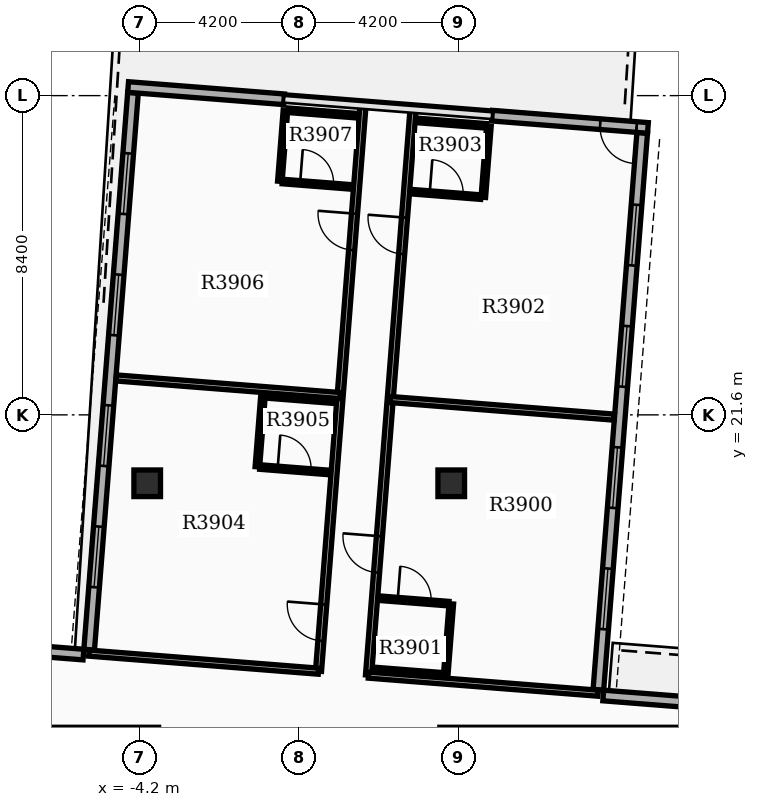
"""IFC4 building model, lengths in metres.
Left out: names, types, materials, properties, quantities, classifications, styles, units other than length and angle.
Written with IfcOpenShell. Run it as: python <this file> out.ifc"""

import sys

from ifc_helpers import new_model, si_unit, direction, frame, frame_2d, origin, origin_2d, place, context, subcontext, project, spatial, rectangle, extrude, element, fill, save


model = new_model("IFC4")
c1 = context("Model", 3, precision=1e-05, world=origin(), true_north=direction((0.0, 1.0)))
c2 = subcontext(c1, "Body", "Model", "MODEL_VIEW")
j1 = project(units=[si_unit("LENGTHUNIT", "METRE"), si_unit("PLANEANGLEUNIT", "RADIAN")], contexts=[c1])
p1 = place(None, origin())
s1 = spatial("IfcSite", under=j1, at=p1, CompositionType="ELEMENT")
p2 = place(p1, origin())
s2 = spatial("IfcBuilding", under=s1, at=p2, CompositionType="ELEMENT")
p3 = place(p2, frame((0.0, 0.0, 245.4)))
s3 = spatial("IfcBuildingStorey", under=s2, at=p3, CompositionType="ELEMENT", Elevation=245.4)
for number, where, z_axis, x_axis in (
    (1, (-4.0, 19.8, 0.0), (0.0, 0.0, 1.0), (1.0, 0.0, 0.0)),
    (2, (4.0, 19.8, 0.0), (0.0, 0.0, 1.0), (1.0, 0.0, 0.0)),
):
    element("IfcColumn", number, at=place(p3, frame(where, z_axis=z_axis, x_axis=x_axis)), inside=s3, PredefinedType="COLUMN", context=c2, shape_type="SweptSolid", body=[
        extrude(rectangle(XDim=0.7, YDim=0.7, at=origin_2d()), origin(), (0.0, 0.0, 1.0), 4.5),
    ])
p4 = place(p3, frame((7.872, 14.367, 0.0), z_axis=(0.0, 0.0, 1.0), x_axis=(0.078456642068, 0.996917526837, 0.0)))
e3 = element("IfcWall", 3, at=p4, inside=s3, PredefinedType="STANDARD", context=c2, shape_type="SweptSolid", body=[
    extrude(rectangle(XDim=14.7, YDim=0.28, at=frame_2d((7.35, 0.0))), origin(), (0.0, 0.0, 1.0), 3.38),
])
p5 = place(p4, frame((1.6, 0.0, 0.8)))
e4 = element("IfcOpeningElement", 4, at=p5, cuts=e3, PredefinedType="OPENING", context=c2, shape_type="SweptSolid", body=[
    extrude(rectangle(XDim=1.6, YDim=1.7, at=frame_2d((0.8, 0.85))), frame((0.0, 0.15, 0.0), z_axis=(0.0, -1.0, 0.0), x_axis=(1.0, 0.0, 0.0)), (0.0, 0.0, 1.0), 0.3),
])
p6 = place(p4, frame((4.8, 0.0, 0.8)))
e5 = element("IfcOpeningElement", 5, at=p6, cuts=e3, PredefinedType="OPENING", context=c2, shape_type="SweptSolid", body=[
    extrude(rectangle(XDim=1.6, YDim=1.7, at=frame_2d((0.8, 0.85))), frame((0.0, 0.15, 0.0), z_axis=(0.0, -1.0, 0.0), x_axis=(1.0, 0.0, 0.0)), (0.0, 0.0, 1.0), 0.3),
])
p7 = place(p4, frame((8.0, 0.0, 0.8)))
e6 = element("IfcOpeningElement", 6, at=p7, cuts=e3, PredefinedType="OPENING", context=c2, shape_type="SweptSolid", body=[
    extrude(rectangle(XDim=1.6, YDim=1.7, at=frame_2d((0.8, 0.85))), frame((0.0, 0.15, 0.0), z_axis=(0.0, -1.0, 0.0), x_axis=(1.0, 0.0, 0.0)), (0.0, 0.0, 1.0), 0.3),
])
p8 = place(p4, frame((11.2, 0.0, 0.8)))
e7 = element("IfcOpeningElement", 7, at=p8, cuts=e3, PredefinedType="OPENING", context=c2, shape_type="SweptSolid", body=[
    extrude(rectangle(XDim=1.6, YDim=1.7, at=frame_2d((0.8, 0.85))), frame((0.0, 0.15, 0.0), z_axis=(0.0, -1.0, 0.0), x_axis=(1.0, 0.0, 0.0)), (0.0, 0.0, 1.0), 0.3),
])
p9 = place(p3, frame((-4.374, 30.076, 0.0), z_axis=(0.0, 0.0, 1.0), x_axis=(-0.078456642068, -0.996917526837, 0.0)))
e8 = element("IfcWall", 8, at=p9, inside=s3, PredefinedType="STANDARD", context=c2, shape_type="SweptSolid", body=[
    extrude(rectangle(XDim=14.7, YDim=0.28, at=frame_2d((7.35, 0.0))), origin(), (0.0, 0.0, 1.0), 3.38),
])
p10 = place(p9, frame((1.6, 0.0, 0.8)))
e9 = element("IfcOpeningElement", 9, at=p10, cuts=e8, PredefinedType="OPENING", context=c2, shape_type="SweptSolid", body=[
    extrude(rectangle(XDim=1.6, YDim=1.7, at=frame_2d((0.8, 0.85))), frame((0.0, 0.15, 0.0), z_axis=(0.0, -1.0, 0.0), x_axis=(1.0, 0.0, 0.0)), (0.0, 0.0, 1.0), 0.3),
])
p11 = place(p9, frame((4.8, 0.0, 0.8)))
e10 = element("IfcOpeningElement", 10, at=p11, cuts=e8, PredefinedType="OPENING", context=c2, shape_type="SweptSolid", body=[
    extrude(rectangle(XDim=1.6, YDim=1.7, at=frame_2d((0.8, 0.85))), frame((0.0, 0.15, 0.0), z_axis=(0.0, -1.0, 0.0), x_axis=(1.0, 0.0, 0.0)), (0.0, 0.0, 1.0), 0.3),
])
p12 = place(p9, frame((8.25, 0.0, 0.8)))
e11 = element("IfcOpeningElement", 11, at=p12, cuts=e8, PredefinedType="OPENING", context=c2, shape_type="SweptSolid", body=[
    extrude(rectangle(XDim=1.6, YDim=1.7, at=frame_2d((0.8, 0.85))), frame((0.0, 0.15, 0.0), z_axis=(0.0, -1.0, 0.0), x_axis=(1.0, 0.0, 0.0)), (0.0, 0.0, 1.0), 0.3),
])
p13 = place(p9, frame((11.45, 0.0, 0.8)))
e12 = element("IfcOpeningElement", 12, at=p13, cuts=e8, PredefinedType="OPENING", context=c2, shape_type="SweptSolid", body=[
    extrude(rectangle(XDim=1.6, YDim=1.7, at=frame_2d((0.8, 0.85))), frame((0.0, 0.15, 0.0), z_axis=(0.0, -1.0, 0.0), x_axis=(1.0, 0.0, 0.0)), (0.0, 0.0, 1.0), 0.3),
])
p14 = place(p3, frame((9.175, 29.15, 0.0), z_axis=(0.0, 0.0, 1.0), x_axis=(-0.996916125428, 0.078474447191, 0.0)))
e13 = element("IfcWall", 13, at=p14, inside=s3, PredefinedType="STANDARD", context=c2, shape_type="SweptSolid", body=[
    extrude(rectangle(XDim=4.116, YDim=0.28, at=frame_2d((2.058, 0.0))), origin(), (0.0, 0.0, 1.0), 3.38),
])
p15 = place(p14, frame((0.3, 0.0, 0.0)))
e14 = element("IfcOpeningElement", 14, at=p15, cuts=e13, PredefinedType="OPENING", context=c2, shape_type="SweptSolid", body=[
    extrude(rectangle(XDim=0.96, YDim=2.1, at=frame_2d((0.48, 1.05))), frame((0.0, 0.15, 0.0), z_axis=(0.0, -1.0, 0.0), x_axis=(1.0, 0.0, 0.0)), (0.0, 0.0, 1.0), 0.3),
])
p16 = place(p3, frame((-0.399, 29.904, 0.0), z_axis=(0.0, 0.0, 1.0), x_axis=(-0.996920764105, 0.078415496528, 0.0)))
e15 = element("IfcWall", 15, at=p16, inside=s3, PredefinedType="STANDARD", context=c2, shape_type="SweptSolid", body=[
    extrude(rectangle(XDim=4.116, YDim=0.28, at=frame_2d((2.058, 0.0))), origin(), (0.0, 0.0, 1.0), 3.38),
])
p17 = place(p3, frame((14.281, 13.722, 0.0), z_axis=(0.0, 0.0, 1.0), x_axis=(-0.99691915642, 0.078435932851, 0.0)))
e16 = element("IfcWall", 16, at=p17, inside=s3, PredefinedType="STANDARD", context=c2, shape_type="SweptSolid", body=[
    extrude(rectangle(XDim=6.3, YDim=0.28, at=frame_2d((3.15, 0.0))), origin(), (0.0, 0.0, 1.0), 3.38),
])
p18 = place(p3, frame((-11.958, 15.787, 0.0), z_axis=(0.0, 0.0, 1.0), x_axis=(0.996916125428, -0.078474447191, 0.0)))
e17 = element("IfcWall", 17, at=p18, inside=s3, PredefinedType="STANDARD", context=c2, shape_type="SweptSolid", body=[
    extrude(rectangle(XDim=6.3, YDim=0.28, at=frame_2d((3.15, 0.0))), origin(), (0.0, 0.0, 1.0), 3.38),
])
for number, where, z_axis, x_axis in (
    (18, (-11.0, 13.3, 0.0), (0.0, 0.0, 1.0), (1.0, 0.0, 0.0)),
    (19, (3.7, 13.3, 0.0), (0.0, 0.0, 1.0), (1.0, 0.0, 0.0)),
):
    element("IfcWall", number, at=place(p3, frame(where, z_axis=z_axis, x_axis=x_axis)), inside=s3, PredefinedType="PARTITIONING", context=c2, shape_type="SweptSolid", body=[
        extrude(rectangle(XDim=7.3, YDim=0.16, at=frame_2d((3.65, 0.0))), origin(), (0.0, 0.0, 1.0), 3.37),
    ])
p19 = place(p3, frame((1.823, 14.752, 0.0), z_axis=(0.0, 0.0, 1.0), x_axis=(0.078458290353, 0.996917397117, 0.0)))
e20 = element("IfcWall", 20, at=p19, inside=s3, PredefinedType="PARTITIONING", context=c2, shape_type="SweptSolid", body=[
    extrude(rectangle(XDim=14.93, YDim=0.16, at=frame_2d((7.465, 0.0))), origin(), (0.0, 0.0, 1.0), 3.37),
])
p20 = place(p19, frame((2.707, 0.0, 0.0)))
e21 = element("IfcOpeningElement", 21, at=p20, cuts=e20, PredefinedType="OPENING", context=c2, shape_type="SweptSolid", body=[
    extrude(rectangle(XDim=0.96, YDim=2.15, at=frame_2d((0.48, 1.075))), frame((0.0, 0.09, 0.0), z_axis=(0.0, -1.0, 0.0), x_axis=(1.0, 0.0, 0.0)), (0.0, 0.0, 1.0), 0.18),
])
p21 = place(p19, frame((11.116, 0.0, 0.0)))
e22 = element("IfcOpeningElement", 22, at=p21, cuts=e20, PredefinedType="OPENING", context=c2, shape_type="SweptSolid", body=[
    extrude(rectangle(XDim=0.96, YDim=2.15, at=frame_2d((0.48, 1.075))), frame((0.0, 0.09, 0.0), z_axis=(0.0, -1.0, 0.0), x_axis=(1.0, 0.0, 0.0)), (0.0, 0.0, 1.0), 0.18),
])
p22 = place(p3, frame((1.823, 14.752, 0.0), z_axis=(0.0, 0.0, 1.0), x_axis=(0.996919074253, -0.078436977191, 0.0)))
e23 = element("IfcWall", 23, at=p22, inside=s3, PredefinedType="PARTITIONING", context=c2, shape_type="SweptSolid", body=[
    extrude(rectangle(XDim=6.06, YDim=0.16, at=frame_2d((3.03, 0.0))), origin(), (0.0, 0.0, 1.0), 3.37),
])
p23 = place(p3, frame((2.394, 22.004, 0.0), z_axis=(0.0, 0.0, 1.0), x_axis=(0.996920362457, -0.078420602639, 0.0)))
e24 = element("IfcWall", 24, at=p23, inside=s3, PredefinedType="PARTITIONING", context=c2, shape_type="SweptSolid", body=[
    extrude(rectangle(XDim=5.912, YDim=0.16, at=frame_2d((2.956, 0.0))), origin(), (0.0, 0.0, 1.0), 3.37),
])
p24 = place(p3, frame((2.123, 16.775, 0.0), z_axis=(0.0, 0.0, 1.0), x_axis=(0.996915574626, -0.078481444107, 0.0)))
e25 = element("IfcWall", 25, at=p24, inside=s3, PredefinedType="PARTITIONING", context=c2, shape_type="SweptSolid", body=[
    extrude(rectangle(XDim=1.82, YDim=0.12, at=frame_2d((0.91, 0.0))), origin(), (0.0, 0.0, 1.0), 3.37),
])
p25 = place(p24, frame((0.47, 0.0, 0.0)))
e26 = element("IfcOpeningElement", 26, at=p25, cuts=e25, PredefinedType="OPENING", context=c2, shape_type="SweptSolid", body=[
    extrude(rectangle(XDim=0.88, YDim=2.1, at=frame_2d((0.44, 1.05))), frame((0.0, 0.07, 0.0), z_axis=(0.0, -1.0, 0.0), x_axis=(1.0, 0.0, 0.0)), (0.0, 0.0, 1.0), 0.14),
])
p26 = place(p3, frame((1.975, 14.901, 0.0), z_axis=(0.0, 0.0, 1.0), x_axis=(0.996926885478, -0.078337634704, 0.0)))
e27 = element("IfcWall", 27, at=p26, inside=s3, PredefinedType="PARTITIONING", context=c2, shape_type="SweptSolid", body=[
    extrude(rectangle(XDim=1.82, YDim=0.12, at=frame_2d((0.91, 0.0))), origin(), (0.0, 0.0, 1.0), 3.37),
])
p27 = place(p3, frame((3.854, 14.753, 0.0), z_axis=(0.0, 0.0, 1.0), x_axis=(0.078444342213, 0.99691849475, 0.0)))
e28 = element("IfcWall", 28, at=p27, inside=s3, PredefinedType="PARTITIONING", context=c2, shape_type="SweptSolid", body=[
    extrude(rectangle(XDim=1.88, YDim=0.12, at=frame_2d((0.94, 0.0))), origin(), (0.0, 0.0, 1.0), 3.37),
])
p28 = place(p3, frame((2.965, 27.472, 0.0), z_axis=(0.0, 0.0, 1.0), x_axis=(0.996916400774, -0.0784709492, 0.0)))
e29 = element("IfcWall", 29, at=p28, inside=s3, PredefinedType="PARTITIONING", context=c2, shape_type="SweptSolid", body=[
    extrude(rectangle(XDim=1.82, YDim=0.12, at=frame_2d((0.91, 0.0))), origin(), (0.0, 0.0, 1.0), 3.37),
])
p29 = place(p28, frame((0.47, 0.0, 0.0)))
e30 = element("IfcOpeningElement", 30, at=p29, cuts=e29, PredefinedType="OPENING", context=c2, shape_type="SweptSolid", body=[
    extrude(rectangle(XDim=0.88, YDim=2.1, at=frame_2d((0.44, 1.05))), frame((0.0, 0.07, 0.0), z_axis=(0.0, -1.0, 0.0), x_axis=(1.0, 0.0, 0.0)), (0.0, 0.0, 1.0), 0.14),
])
p30 = place(p3, frame((3.112, 29.346, 0.0), z_axis=(0.0, 0.0, 1.0), x_axis=(0.996926885478, -0.078337634704, 0.0)))
e31 = element("IfcWall", 31, at=p30, inside=s3, PredefinedType="PARTITIONING", context=c2, shape_type="SweptSolid", body=[
    extrude(rectangle(XDim=1.82, YDim=0.12, at=frame_2d((0.91, 0.0))), origin(), (0.0, 0.0, 1.0), 3.37),
])
p31 = place(p3, frame((4.844, 27.324, 0.0), z_axis=(0.0, 0.0, 1.0), x_axis=(0.07843418698, 0.996919293781, 0.0)))
e32 = element("IfcWall", 32, at=p31, inside=s3, PredefinedType="PARTITIONING", context=c2, shape_type="SweptSolid", body=[
    extrude(rectangle(XDim=1.88, YDim=0.12, at=frame_2d((0.94, 0.0))), origin(), (0.0, 0.0, 1.0), 3.37),
])
p32 = place(p3, frame((0.507, 14.856, 0.0), z_axis=(0.0, 0.0, 1.0), x_axis=(0.078458290353, 0.996917397117, 0.0)))
e33 = element("IfcWall", 33, at=p32, inside=s3, PredefinedType="PARTITIONING", context=c2, shape_type="SweptSolid", body=[
    extrude(rectangle(XDim=14.93, YDim=0.16, at=frame_2d((7.465, 0.0))), origin(), (0.0, 0.0, 1.0), 3.37),
])
p33 = place(p32, frame((0.802, 0.0, 0.0)))
e34 = element("IfcOpeningElement", 34, at=p33, cuts=e33, PredefinedType="OPENING", context=c2, shape_type="SweptSolid", body=[
    extrude(rectangle(XDim=0.96, YDim=2.15, at=frame_2d((0.48, 1.075))), frame((0.0, 0.09, 0.0), z_axis=(0.0, -1.0, 0.0), x_axis=(1.0, 0.0, 0.0)), (0.0, 0.0, 1.0), 0.18),
])
p34 = place(p32, frame((11.116, 0.0, 0.0)))
e35 = element("IfcOpeningElement", 35, at=p34, cuts=e33, PredefinedType="OPENING", context=c2, shape_type="SweptSolid", body=[
    extrude(rectangle(XDim=0.96, YDim=2.15, at=frame_2d((0.48, 1.075))), frame((0.0, 0.09, 0.0), z_axis=(0.0, -1.0, 0.0), x_axis=(1.0, 0.0, 0.0)), (0.0, 0.0, 1.0), 0.18),
])
p35 = place(p3, frame((0.507, 14.856, 0.0), z_axis=(0.0, 0.0, 1.0), x_axis=(-0.996915675155, 0.078480167113, 0.0)))
e36 = element("IfcWall", 36, at=p35, inside=s3, PredefinedType="PARTITIONING", context=c2, shape_type="SweptSolid", body=[
    extrude(rectangle(XDim=6.06, YDim=0.16, at=frame_2d((3.03, 0.0))), origin(), (0.0, 0.0, 1.0), 3.37),
])
p36 = place(p3, frame((1.078, 22.108, 0.0), z_axis=(0.0, 0.0, 1.0), x_axis=(-0.996920362457, 0.078420602639, 0.0)))
e37 = element("IfcWall", 37, at=p36, inside=s3, PredefinedType="PARTITIONING", context=c2, shape_type="SweptSolid", body=[
    extrude(rectangle(XDim=5.912, YDim=0.16, at=frame_2d((2.956, 0.0))), origin(), (0.0, 0.0, 1.0), 3.37),
])
p37 = place(p3, frame((-1.036, 20.228, 0.0), z_axis=(0.0, 0.0, 1.0), x_axis=(0.996916400774, -0.0784709492, 0.0)))
e38 = element("IfcWall", 38, at=p37, inside=s3, PredefinedType="PARTITIONING", context=c2, shape_type="SweptSolid", body=[
    extrude(rectangle(XDim=1.82, YDim=0.12, at=frame_2d((0.91, 0.0))), origin(), (0.0, 0.0, 1.0), 3.37),
])
p38 = place(p37, frame((0.47, 0.0, 0.0)))
e39 = element("IfcOpeningElement", 39, at=p38, cuts=e38, PredefinedType="OPENING", context=c2, shape_type="SweptSolid", body=[
    extrude(rectangle(XDim=0.88, YDim=2.1, at=frame_2d((0.44, 1.05))), frame((0.0, 0.07, 0.0), z_axis=(0.0, -1.0, 0.0), x_axis=(1.0, 0.0, 0.0)), (0.0, 0.0, 1.0), 0.14),
])
p39 = place(p3, frame((-0.889, 22.102, 0.0), z_axis=(0.0, 0.0, 1.0), x_axis=(0.996916400774, -0.0784709492, 0.0)))
e40 = element("IfcWall", 40, at=p39, inside=s3, PredefinedType="PARTITIONING", context=c2, shape_type="SweptSolid", body=[
    extrude(rectangle(XDim=1.82, YDim=0.12, at=frame_2d((0.91, 0.0))), origin(), (0.0, 0.0, 1.0), 3.37),
])
p40 = place(p3, frame((-1.101, 20.233, 0.0), z_axis=(0.0, 0.0, 1.0), x_axis=(0.078573415792, 0.996908329954, 0.0)))
e41 = element("IfcWall", 41, at=p40, inside=s3, PredefinedType="PARTITIONING", context=c2, shape_type="SweptSolid", body=[
    extrude(rectangle(XDim=1.88, YDim=0.12, at=frame_2d((0.94, 0.0))), origin(), (0.0, 0.0, 1.0), 3.37),
])
p41 = place(p3, frame((-0.445, 27.74, 0.0), z_axis=(0.0, 0.0, 1.0), x_axis=(0.996915574626, -0.078481444107, 0.0)))
e42 = element("IfcWall", 42, at=p41, inside=s3, PredefinedType="PARTITIONING", context=c2, shape_type="SweptSolid", body=[
    extrude(rectangle(XDim=1.82, YDim=0.12, at=frame_2d((0.91, 0.0))), origin(), (0.0, 0.0, 1.0), 3.37),
])
p42 = place(p41, frame((0.47, 0.0, 0.0)))
e43 = element("IfcOpeningElement", 43, at=p42, cuts=e42, PredefinedType="OPENING", context=c2, shape_type="SweptSolid", body=[
    extrude(rectangle(XDim=0.88, YDim=2.1, at=frame_2d((0.44, 1.05))), frame((0.0, 0.07, 0.0), z_axis=(0.0, -1.0, 0.0), x_axis=(1.0, 0.0, 0.0)), (0.0, 0.0, 1.0), 0.14),
])
p43 = place(p3, frame((-0.297, 29.615, 0.0), z_axis=(0.0, 0.0, 1.0), x_axis=(0.996916400774, -0.0784709492, 0.0)))
e44 = element("IfcWall", 44, at=p43, inside=s3, PredefinedType="PARTITIONING", context=c2, shape_type="SweptSolid", body=[
    extrude(rectangle(XDim=1.82, YDim=0.12, at=frame_2d((0.91, 0.0))), origin(), (0.0, 0.0, 1.0), 3.37),
])
p44 = place(p3, frame((-0.51, 27.746, 0.0), z_axis=(0.0, 0.0, 1.0), x_axis=(0.078444342213, 0.99691849475, 0.0)))
e45 = element("IfcWall", 45, at=p44, inside=s3, PredefinedType="PARTITIONING", context=c2, shape_type="SweptSolid", body=[
    extrude(rectangle(XDim=1.88, YDim=0.12, at=frame_2d((0.94, 0.0))), origin(), (0.0, 0.0, 1.0), 3.37),
])
p45 = place(p5, origin())
e46 = element("IfcWindow", 46, at=p45, inside=s3, PartitioningType="SINGLE_PANEL", PredefinedType="WINDOW", context=c2, shape_type="SweptSolid", body=[
    extrude(rectangle(XDim=1.6, YDim=1.7, at=frame_2d((0.8, 0.85))), frame((0.0, 0.03, 0.0), z_axis=(0.0, -1.0, 0.0), x_axis=(1.0, 0.0, 0.0)), (0.0, 0.0, 1.0), 0.06),
])
fill(e4, e46)
p46 = place(p6, origin())
e47 = element("IfcWindow", 47, at=p46, inside=s3, PartitioningType="SINGLE_PANEL", PredefinedType="WINDOW", context=c2, shape_type="SweptSolid", body=[
    extrude(rectangle(XDim=1.6, YDim=1.7, at=frame_2d((0.8, 0.85))), frame((0.0, 0.03, 0.0), z_axis=(0.0, -1.0, 0.0), x_axis=(1.0, 0.0, 0.0)), (0.0, 0.0, 1.0), 0.06),
])
fill(e5, e47)
p47 = place(p7, origin())
e48 = element("IfcWindow", 48, at=p47, inside=s3, PartitioningType="SINGLE_PANEL", PredefinedType="WINDOW", context=c2, shape_type="SweptSolid", body=[
    extrude(rectangle(XDim=1.6, YDim=1.7, at=frame_2d((0.8, 0.85))), frame((0.0, 0.03, 0.0), z_axis=(0.0, -1.0, 0.0), x_axis=(1.0, 0.0, 0.0)), (0.0, 0.0, 1.0), 0.06),
])
fill(e6, e48)
p48 = place(p8, origin())
e49 = element("IfcWindow", 49, at=p48, inside=s3, PartitioningType="SINGLE_PANEL", PredefinedType="WINDOW", context=c2, shape_type="SweptSolid", body=[
    extrude(rectangle(XDim=1.6, YDim=1.7, at=frame_2d((0.8, 0.85))), frame((0.0, 0.03, 0.0), z_axis=(0.0, -1.0, 0.0), x_axis=(1.0, 0.0, 0.0)), (0.0, 0.0, 1.0), 0.06),
])
fill(e7, e49)
p49 = place(p10, origin())
e50 = element("IfcWindow", 50, at=p49, inside=s3, PartitioningType="SINGLE_PANEL", PredefinedType="WINDOW", context=c2, shape_type="SweptSolid", body=[
    extrude(rectangle(XDim=1.6, YDim=1.7, at=frame_2d((0.8, 0.85))), frame((0.0, 0.03, 0.0), z_axis=(0.0, -1.0, 0.0), x_axis=(1.0, 0.0, 0.0)), (0.0, 0.0, 1.0), 0.06),
])
fill(e9, e50)
p50 = place(p11, origin())
e51 = element("IfcWindow", 51, at=p50, inside=s3, PartitioningType="SINGLE_PANEL", PredefinedType="WINDOW", context=c2, shape_type="SweptSolid", body=[
    extrude(rectangle(XDim=1.6, YDim=1.7, at=frame_2d((0.8, 0.85))), frame((0.0, 0.03, 0.0), z_axis=(0.0, -1.0, 0.0), x_axis=(1.0, 0.0, 0.0)), (0.0, 0.0, 1.0), 0.06),
])
fill(e10, e51)
p51 = place(p12, origin())
e52 = element("IfcWindow", 52, at=p51, inside=s3, PartitioningType="SINGLE_PANEL", PredefinedType="WINDOW", context=c2, shape_type="SweptSolid", body=[
    extrude(rectangle(XDim=1.6, YDim=1.7, at=frame_2d((0.8, 0.85))), frame((0.0, 0.03, 0.0), z_axis=(0.0, -1.0, 0.0), x_axis=(1.0, 0.0, 0.0)), (0.0, 0.0, 1.0), 0.06),
])
fill(e11, e52)
p52 = place(p13, origin())
e53 = element("IfcWindow", 53, at=p52, inside=s3, PartitioningType="SINGLE_PANEL", PredefinedType="WINDOW", context=c2, shape_type="SweptSolid", body=[
    extrude(rectangle(XDim=1.6, YDim=1.7, at=frame_2d((0.8, 0.85))), frame((0.0, 0.03, 0.0), z_axis=(0.0, -1.0, 0.0), x_axis=(1.0, 0.0, 0.0)), (0.0, 0.0, 1.0), 0.06),
])
fill(e12, e53)
p53 = place(p15, origin())
e54 = element("IfcDoor", 54, at=p53, inside=s3, OperationType="SINGLE_SWING_LEFT", PredefinedType="DOOR", context=c2, shape_type="SweptSolid", body=[
    extrude(rectangle(XDim=0.96, YDim=2.1, at=frame_2d((0.48, 1.05))), frame((0.0, 0.025, 0.0), z_axis=(0.0, -1.0, 0.0), x_axis=(1.0, 0.0, 0.0)), (0.0, 0.0, 1.0), 0.05),
])
fill(e14, e54)
p54 = place(p20, origin())
e55 = element("IfcDoor", 55, at=p54, inside=s3, OperationType="SINGLE_SWING_RIGHT", PredefinedType="DOOR", context=c2, shape_type="SweptSolid", body=[
    extrude(rectangle(XDim=0.96, YDim=2.15, at=frame_2d((0.48, 1.075))), frame((0.0, 0.025, 0.0), z_axis=(0.0, -1.0, 0.0), x_axis=(1.0, 0.0, 0.0)), (0.0, 0.0, 1.0), 0.05),
])
fill(e21, e55)
p55 = place(p25, origin())
e56 = element("IfcDoor", 56, at=p55, inside=s3, OperationType="SINGLE_SWING_LEFT", PredefinedType="DOOR", context=c2, shape_type="SweptSolid", body=[
    extrude(rectangle(XDim=0.88, YDim=2.1, at=frame_2d((0.44, 1.05))), frame((0.0, 0.025, 0.0), z_axis=(0.0, -1.0, 0.0), x_axis=(1.0, 0.0, 0.0)), (0.0, 0.0, 1.0), 0.05),
])
fill(e26, e56)
p56 = place(p21, origin())
e57 = element("IfcDoor", 57, at=p56, inside=s3, OperationType="SINGLE_SWING_RIGHT", PredefinedType="DOOR", context=c2, shape_type="SweptSolid", body=[
    extrude(rectangle(XDim=0.96, YDim=2.15, at=frame_2d((0.48, 1.075))), frame((0.0, 0.025, 0.0), z_axis=(0.0, -1.0, 0.0), x_axis=(1.0, 0.0, 0.0)), (0.0, 0.0, 1.0), 0.05),
])
fill(e22, e57)
p57 = place(p29, origin())
e58 = element("IfcDoor", 58, at=p57, inside=s3, OperationType="SINGLE_SWING_LEFT", PredefinedType="DOOR", context=c2, shape_type="SweptSolid", body=[
    extrude(rectangle(XDim=0.88, YDim=2.1, at=frame_2d((0.44, 1.05))), frame((0.0, 0.025, 0.0), z_axis=(0.0, -1.0, 0.0), x_axis=(1.0, 0.0, 0.0)), (0.0, 0.0, 1.0), 0.05),
])
fill(e30, e58)
p58 = place(p33, origin())
e59 = element("IfcDoor", 59, at=p58, inside=s3, OperationType="SINGLE_SWING_RIGHT", PredefinedType="DOOR", context=c2, shape_type="SweptSolid", body=[
    extrude(rectangle(XDim=0.96, YDim=2.15, at=frame_2d((0.48, 1.075))), frame((0.0, 0.025, 0.0), z_axis=(0.0, -1.0, 0.0), x_axis=(1.0, 0.0, 0.0)), (0.0, 0.0, 1.0), 0.05),
])
fill(e34, e59)
p59 = place(p38, origin())
e60 = element("IfcDoor", 60, at=p59, inside=s3, OperationType="SINGLE_SWING_LEFT", PredefinedType="DOOR", context=c2, shape_type="SweptSolid", body=[
    extrude(rectangle(XDim=0.88, YDim=2.1, at=frame_2d((0.44, 1.05))), frame((0.0, 0.025, 0.0), z_axis=(0.0, -1.0, 0.0), x_axis=(1.0, 0.0, 0.0)), (0.0, 0.0, 1.0), 0.05),
])
fill(e39, e60)
p60 = place(p34, origin())
e61 = element("IfcDoor", 61, at=p60, inside=s3, OperationType="SINGLE_SWING_RIGHT", PredefinedType="DOOR", context=c2, shape_type="SweptSolid", body=[
    extrude(rectangle(XDim=0.96, YDim=2.15, at=frame_2d((0.48, 1.075))), frame((0.0, 0.025, 0.0), z_axis=(0.0, -1.0, 0.0), x_axis=(1.0, 0.0, 0.0)), (0.0, 0.0, 1.0), 0.05),
])
fill(e35, e61)
p61 = place(p42, origin())
e62 = element("IfcDoor", 62, at=p61, inside=s3, OperationType="SINGLE_SWING_LEFT", PredefinedType="DOOR", context=c2, shape_type="SweptSolid", body=[
    extrude(rectangle(XDim=0.88, YDim=2.1, at=frame_2d((0.44, 1.05))), frame((0.0, 0.025, 0.0), z_axis=(0.0, -1.0, 0.0), x_axis=(1.0, 0.0, 0.0)), (0.0, 0.0, 1.0), 0.05),
])
fill(e43, e62)
save(model, sys.argv[1])
